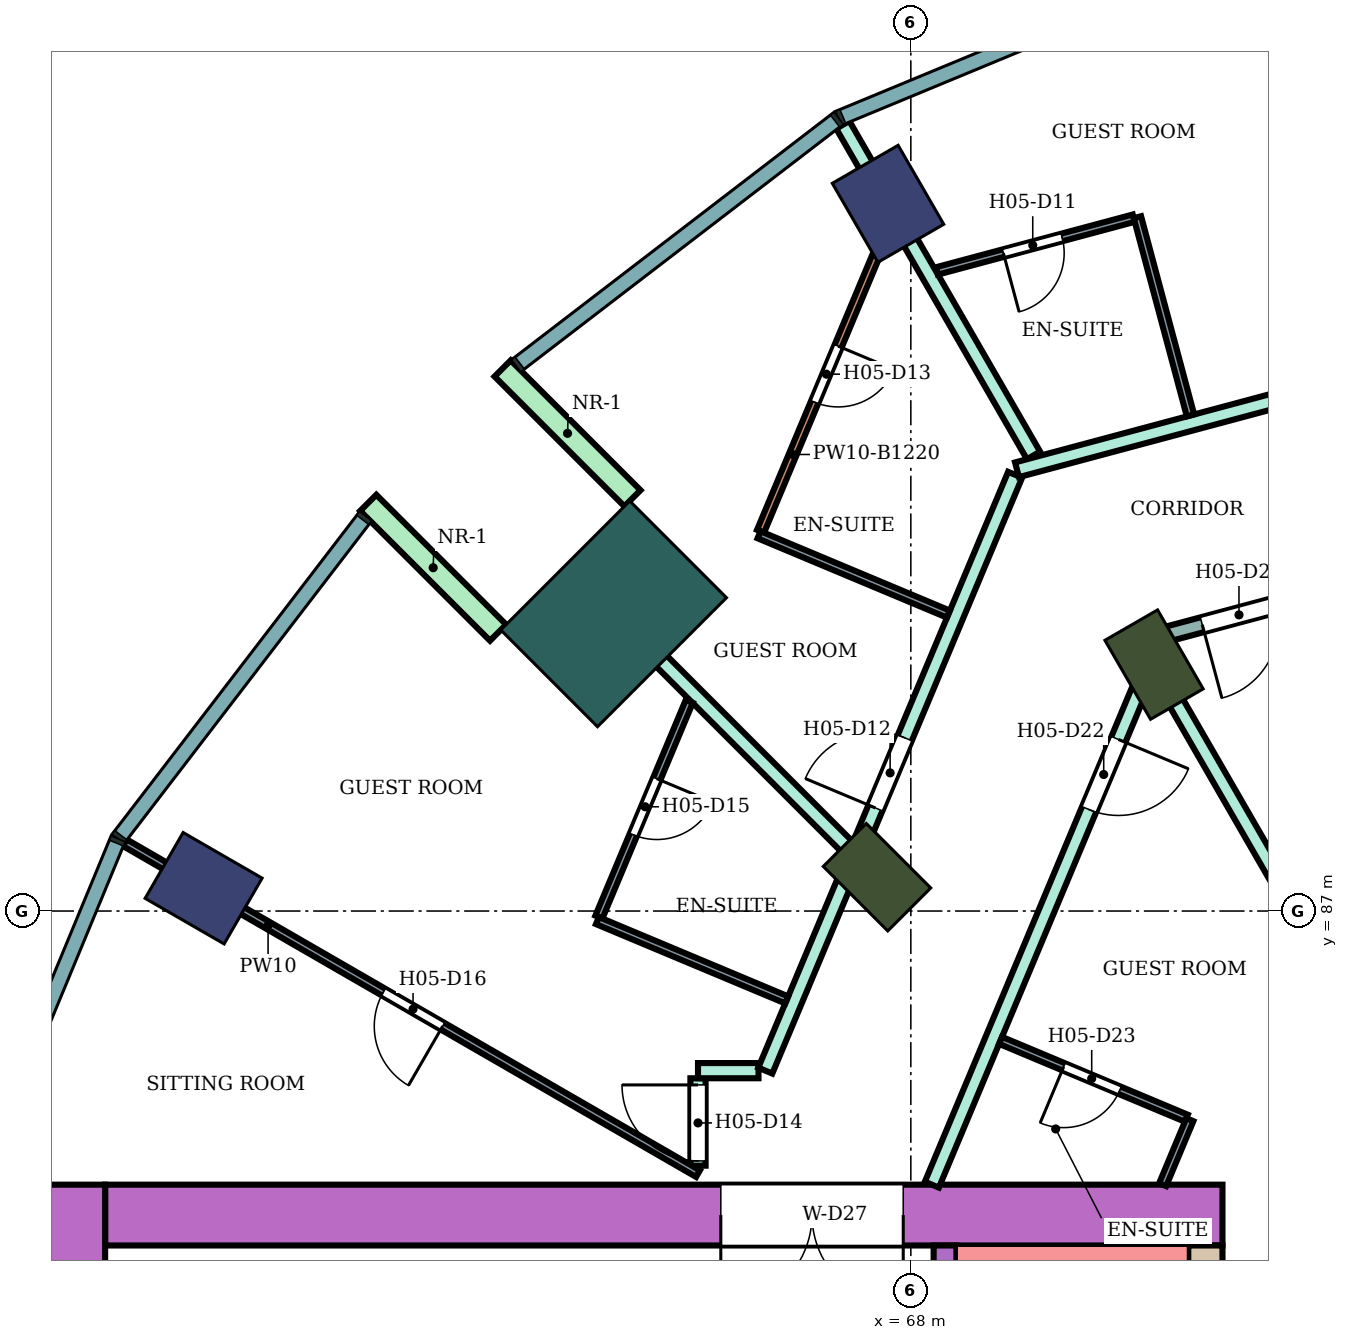
"""IFC4 building model, lengths in metres.
Left out: names, types, materials, properties, quantities, classifications, styles, units other than length and angle.
Written with IfcOpenShell. Run it as: python <this file> out.ifc"""

import sys

from ifc_helpers import new_model, si_unit, direction, frame, frame_2d, origin, origin_2d, place, context, subcontext, project, spatial, rectangle, extrude, element, fill, save


model = new_model("IFC4")
c1 = context("Model", 3, precision=1e-05, world=origin(), true_north=direction((0.0, 1.0)))
c2 = subcontext(c1, "Body", "Model", "MODEL_VIEW")
j1 = project(units=[si_unit("LENGTHUNIT", "METRE"), si_unit("PLANEANGLEUNIT", "RADIAN")], contexts=[c1])
p1 = place(None, origin())
s1 = spatial("IfcSite", under=j1, at=p1, CompositionType="ELEMENT")
p2 = place(p1, origin())
s2 = spatial("IfcBuilding", under=s1, at=p2, CompositionType="ELEMENT")
p3 = place(p2, frame((0.0, 0.0, 90.0)))
s3 = spatial("IfcBuildingStorey", under=s2, at=p3, CompositionType="ELEMENT", Elevation=90.0)
for number, where, z_axis, x_axis in (
    (1, (67.7, 96.304, 0.0), (0.0, 0.0, 1.0), (-0.5, 0.866, 0.0)),
    (2, (58.696, 87.3, 0.0), (0.0, 0.0, 1.0), (-0.866, 0.5, 0.0)),
):
    element("IfcColumn", number, at=place(p3, frame(where, z_axis=z_axis, x_axis=x_axis)), inside=s3, PredefinedType="COLUMN", context=c2, shape_type="SweptSolid", body=[
        extrude(rectangle(XDim=1.2, YDim=1.0, at=origin_2d()), origin(), (0.0, 0.0, 1.0), 3.8),
    ])
for number, where, z_axis, x_axis in (
    (3, (71.2, 90.242, 0.0), (0.0, 0.0, 1.0), (-0.5, 0.866, 0.0)),
    (4, (67.555, 87.445, 0.0), (0.0, 0.0, 1.0), (-0.707, 0.707, 0.0)),
):
    element("IfcColumn", number, at=place(p3, frame(where, z_axis=z_axis, x_axis=x_axis)), inside=s3, PredefinedType="COLUMN", context=c2, shape_type="SweptSolid", body=[
        extrude(rectangle(XDim=1.2, YDim=0.8, at=origin_2d()), origin(), (0.0, 0.0, 1.0), 3.8),
    ])
p4 = place(p3, frame((64.09, 90.91, 0.0), z_axis=(0.0, 0.0, 1.0), x_axis=(-0.707106781187, 0.707106781187, 0.0)))
e5 = element("IfcColumn", 5, at=p4, inside=s3, PredefinedType="COLUMN", context=c2, shape_type="SweptSolid", body=[
    extrude(rectangle(XDim=1.8, YDim=2.4, at=origin_2d()), origin(), (0.0, 0.0, 1.0), 3.8),
])
p5 = place(p3, frame((72.1, 83.0, 0.0), z_axis=(0.0, 0.0, 1.0), x_axis=(-1.0, 0.0, 0.0)))
e6 = element("IfcWall", 6, at=p5, inside=s3, PredefinedType="SHEAR", context=c2, shape_type="SweptSolid", body=[
    extrude(rectangle(XDim=14.7, YDim=0.8, at=frame_2d((7.35, 0.0))), origin(), (0.0, 0.0, 1.0), 3.48),
])
p6 = place(p5, frame((4.2, 0.0, 0.0)))
e7 = element("IfcOpeningElement", 7, at=p6, cuts=e6, PredefinedType="OPENING", context=c2, shape_type="SweptSolid", body=[
    extrude(rectangle(XDim=2.4, YDim=2.4, at=frame_2d((1.2, 1.2))), frame((0.0, 0.41, 0.0), z_axis=(0.0, -1.0, 0.0), x_axis=(1.0, 0.0, 0.0)), (0.0, 0.0, 1.0), 0.82),
])
p7 = place(p3, frame((71.875, 82.6, 0.0), z_axis=(0.0, 0.0, 1.0), x_axis=(0.0, -1.0, 0.0)))
e8 = element("IfcWall", 8, at=p7, inside=s3, PredefinedType="SHEAR", context=c2, shape_type="SweptSolid", body=[
    extrude(rectangle(XDim=7.6, YDim=0.45, at=frame_2d((3.8, 0.0))), origin(), (0.0, 0.0, 1.0), 3.48),
])
p8 = place(p3, frame((57.0, 83.4, 0.0), z_axis=(0.0, 0.0, 1.0), x_axis=(0.0, -1.0, 0.0)))
e9 = element("IfcWall", 9, at=p8, inside=s3, PredefinedType="SHEAR", context=c2, shape_type="SweptSolid", body=[
    extrude(rectangle(XDim=16.8, YDim=0.8, at=frame_2d((8.4, 0.0))), origin(), (0.0, 0.0, 1.0), 3.48),
])
p9 = place(p3, frame((68.45, 82.6, 0.0), z_axis=(0.0, 0.0, 1.0), x_axis=(0.0, -1.0, 0.0)))
e10 = element("IfcWall", 10, at=p9, inside=s3, PredefinedType="SHEAR", context=c2, shape_type="SweptSolid", body=[
    extrude(rectangle(XDim=7.6, YDim=0.3, at=frame_2d((3.8, 0.0))), origin(), (0.0, 0.0, 1.0), 3.48),
])
p10 = place(p9, frame((0.25, 0.0, 0.0)))
e11 = element("IfcOpeningElement", 11, at=p10, cuts=e10, PredefinedType="OPENING", context=c2, shape_type="SweptSolid", body=[
    extrude(rectangle(XDim=0.9, YDim=2.1, at=frame_2d((0.45, 1.05))), frame((0.0, 0.16, 0.0), z_axis=(0.0, -1.0, 0.0), x_axis=(1.0, 0.0, 0.0)), (0.0, 0.0, 1.0), 0.32),
])
for number, where, z_axis, x_axis in (
    (12, (64.338, 92.43, 0.0), (0.0, 0.0, 1.0), (-0.707, 0.707, 0.0)),
    (13, (62.57, 90.662, 0.0), (0.0, 0.0, 1.0), (-0.707, 0.707, 0.0)),
):
    element("IfcWall", number, at=place(p3, frame(where, z_axis=z_axis, x_axis=x_axis)), inside=s3, PredefinedType="NOTDEFINED", context=c2, shape_type="SweptSolid", body=[
        extrude(rectangle(XDim=2.416, YDim=0.3, at=frame_2d((1.208, 0.0))), origin(), (0.0, 0.0, 1.0), 3.8),
    ])
p11 = place(p3, frame((63.6, 91.409, 0.0), z_axis=(0.0, 0.0, 1.0), x_axis=(0.70693749829, -0.707276023566, 0.0)))
e14 = element("IfcWall", 14, at=p11, inside=s3, PredefinedType="PARTITIONING", context=c2, shape_type="SweptSolid", body=[
    extrude(rectangle(XDim=5.048, YDim=0.2, at=frame_2d((2.524, 0.0))), origin(), (0.0, 0.0, 1.0), 3.35),
])
p12 = place(p3, frame((65.2, 83.65, 0.0), z_axis=(0.0, 0.0, 1.0), x_axis=(0.0, 1.0, 0.0)))
e15 = element("IfcWall", 15, at=p12, inside=s3, PredefinedType="PARTITIONING", context=c2, shape_type="SweptSolid", body=[
    extrude(rectangle(XDim=1.15, YDim=0.2, at=frame_2d((0.575, 0.0))), origin(), (0.0, 0.0, 1.0), 3.35),
])
p13 = place(p12, frame((0.062, 0.0, 0.0)))
e16 = element("IfcOpeningElement", 16, at=p13, cuts=e15, PredefinedType="OPENING", context=c2, shape_type="SweptSolid", body=[
    extrude(rectangle(XDim=1.0, YDim=2.1, at=frame_2d((0.5, 1.05))), frame((0.0, 0.11, 0.0), z_axis=(0.0, -1.0, 0.0), x_axis=(1.0, 0.0, 0.0)), (0.0, 0.0, 1.0), 0.22),
])
p14 = place(p3, frame((65.2, 84.9, 0.0), z_axis=(0.0, 0.0, 1.0), x_axis=(1.0, 0.0, 0.0)))
e17 = element("IfcWall", 17, at=p14, inside=s3, PredefinedType="PARTITIONING", context=c2, shape_type="SweptSolid", body=[
    extrude(rectangle(XDim=0.796, YDim=0.2, at=frame_2d((0.398, 0.0))), origin(), (0.0, 0.0, 1.0), 3.35),
])
p15 = place(p3, frame((66.085, 84.9, 0.0), z_axis=(0.0, 0.0, 1.0), x_axis=(0.386676248006, 0.922215527536, 0.0)))
e18 = element("IfcWall", 18, at=p15, inside=s3, PredefinedType="PARTITIONING", context=c2, shape_type="SweptSolid", body=[
    extrude(rectangle(XDim=8.5, YDim=0.2, at=frame_2d((4.25, 0.0))), origin(), (0.0, 0.0, 1.0), 3.35),
])
p16 = place(p15, frame((3.748, 0.0, 0.0)))
e19 = element("IfcOpeningElement", 19, at=p16, cuts=e18, PredefinedType="OPENING", context=c2, shape_type="SweptSolid", body=[
    extrude(rectangle(XDim=1.0, YDim=2.1, at=frame_2d((0.5, 1.05))), frame((0.0, 0.11, 0.0), z_axis=(0.0, -1.0, 0.0), x_axis=(1.0, 0.0, 0.0)), (0.0, 0.0, 1.0), 0.22),
])
p17 = place(p3, frame((67.104, 97.343, 0.0), z_axis=(0.0, 0.0, 1.0), x_axis=(0.499799615385, -0.866141064989, 0.0)))
e20 = element("IfcWall", 20, at=p17, inside=s3, PredefinedType="PARTITIONING", context=c2, shape_type="SweptSolid", body=[
    extrude(rectangle(XDim=5.021, YDim=0.2, at=frame_2d((2.511, 0.0))), origin(), (0.0, 0.0, 1.0), 3.35),
])
p18 = place(p3, frame((68.277, 83.4, 0.0), z_axis=(0.0, 0.0, 1.0), x_axis=(0.386454861164, 0.922308321703, 0.0)))
e21 = element("IfcWall", 21, at=p18, inside=s3, PredefinedType="PARTITIONING", context=c2, shape_type="SweptSolid", body=[
    extrude(rectangle(XDim=7.762, YDim=0.2, at=frame_2d((3.881, 0.0))), origin(), (0.0, 0.0, 1.0), 3.35),
])
p19 = place(p18, frame((5.351, 0.0, 0.0)))
e22 = element("IfcOpeningElement", 22, at=p19, cuts=e21, PredefinedType="OPENING", context=c2, shape_type="SweptSolid", body=[
    extrude(rectangle(XDim=1.0, YDim=2.1, at=frame_2d((0.5, 1.05))), frame((0.0, 0.11, 0.0), z_axis=(0.0, -1.0, 0.0), x_axis=(1.0, 0.0, 0.0)), (0.0, 0.0, 1.0), 0.22),
])
p20 = place(p3, frame((69.397, 92.805, 0.0), z_axis=(0.0, 0.0, 1.0), x_axis=(0.96596468683, 0.258673972015, 0.0)))
e23 = element("IfcWall", 23, at=p20, inside=s3, PredefinedType="PARTITIONING", context=c2, shape_type="SweptSolid", body=[
    extrude(rectangle(XDim=10.937, YDim=0.2, at=frame_2d((5.469, 0.0))), origin(), (0.0, 0.0, 1.0), 3.35),
])
p21 = place(p20, frame((6.163, 0.0, 0.0)))
e24 = element("IfcOpeningElement", 24, at=p21, cuts=e23, PredefinedType="OPENING", context=c2, shape_type="SweptSolid", body=[
    extrude(rectangle(XDim=1.0, YDim=2.1, at=frame_2d((0.5, 1.05))), frame((0.0, 0.11, 0.0), z_axis=(0.0, -1.0, 0.0), x_axis=(1.0, 0.0, 0.0)), (0.0, 0.0, 1.0), 0.22),
])
p22 = place(p20, frame((4.103, 0.0, 0.0)))
e25 = element("IfcOpeningElement", 25, at=p22, cuts=e23, PredefinedType="OPENING", context=c2, shape_type="SweptSolid", body=[
    extrude(rectangle(XDim=1.0, YDim=2.1, at=frame_2d((0.5, 1.05))), frame((0.0, 0.11, 0.0), z_axis=(0.0, -1.0, 0.0), x_axis=(1.0, 0.0, 0.0)), (0.0, 0.0, 1.0), 0.22),
])
p23 = place(p3, frame((71.264, 90.135, 0.0), z_axis=(0.0, 0.0, 1.0), x_axis=(0.499791624077, -0.866145676259, 0.0)))
e26 = element("IfcWall", 26, at=p23, inside=s3, PredefinedType="PARTITIONING", context=c2, shape_type="SweptSolid", body=[
    extrude(rectangle(XDim=9.778, YDim=0.2, at=frame_2d((4.889, 0.0))), origin(), (0.0, 0.0, 1.0), 3.35),
])
p24 = place(p3, frame((71.303, 90.625, 0.0), z_axis=(0.0, 0.0, 1.0), x_axis=(0.965971868307, 0.258647152776, 0.0)))
e27 = element("IfcWall", 27, at=p24, inside=s3, PredefinedType="PARTITIONING", context=c2, shape_type="SweptSolid", body=[
    extrude(rectangle(XDim=8.874, YDim=0.2, at=frame_2d((4.437, 0.0))), origin(), (0.0, 0.0, 1.0), 2.98),
])
p25 = place(p24, frame((0.55, 0.0, 0.0)))
e28 = element("IfcOpeningElement", 28, at=p25, cuts=e27, PredefinedType="OPENING", context=c2, shape_type="SweptSolid", body=[
    extrude(rectangle(XDim=1.0, YDim=2.1, at=frame_2d((0.5, 1.05))), frame((0.0, 0.11, 0.0), z_axis=(0.0, -1.0, 0.0), x_axis=(1.0, 0.0, 0.0)), (0.0, 0.0, 1.0), 0.22),
])
p26 = place(p3, frame((57.659, 87.899, 0.0), z_axis=(0.0, 0.0, 1.0), x_axis=(0.86602264145, -0.500004784474, 0.0)))
e29 = element("IfcWall", 29, at=p26, inside=s3, PredefinedType="PARTITIONING", context=c2, shape_type="SweptSolid", body=[
    extrude(rectangle(XDim=8.708, YDim=0.1, at=frame_2d((4.354, 0.0))), origin(), (0.0, 0.0, 1.0), 3.35),
])
p27 = place(p26, frame((3.929, 0.0, 0.0)))
e30 = element("IfcOpeningElement", 30, at=p27, cuts=e29, PredefinedType="OPENING", context=c2, shape_type="SweptSolid", body=[
    extrude(rectangle(XDim=0.9, YDim=2.1, at=frame_2d((0.45, 1.05))), frame((0.0, 0.06, 0.0), z_axis=(0.0, -1.0, 0.0), x_axis=(1.0, 0.0, 0.0)), (0.0, 0.0, 1.0), 0.12),
])
p28 = place(p3, frame((63.896, 86.92, 0.0), z_axis=(0.0, 0.0, 1.0), x_axis=(0.386485049699, 0.922295671875, 0.0)))
e31 = element("IfcWall", 31, at=p28, inside=s3, PredefinedType="PARTITIONING", context=c2, shape_type="SweptSolid", body=[
    extrude(rectangle(XDim=3.077, YDim=0.1, at=frame_2d((1.539, 0.0))), origin(), (0.0, 0.0, 1.0), 3.35),
])
p29 = place(p28, frame((1.174, 0.0, 0.0)))
e32 = element("IfcOpeningElement", 32, at=p29, cuts=e31, PredefinedType="OPENING", context=c2, shape_type="SweptSolid", body=[
    extrude(rectangle(XDim=0.8, YDim=2.1, at=frame_2d((0.4, 1.05))), frame((0.0, 0.06, 0.0), z_axis=(0.0, -1.0, 0.0), x_axis=(1.0, 0.0, 0.0)), (0.0, 0.0, 1.0), 0.12),
])
p30 = place(p3, frame((63.877, 86.874, 0.0), z_axis=(0.0, 0.0, 1.0), x_axis=(0.922350337209, -0.386354572188, 0.0)))
e33 = element("IfcWall", 33, at=p30, inside=s3, PredefinedType="PARTITIONING", context=c2, shape_type="SweptSolid", body=[
    extrude(rectangle(XDim=2.7, YDim=0.1, at=frame_2d((1.35, 0.0))), origin(), (0.0, 0.0, 1.0), 3.35),
])
p31 = place(p3, frame((66.023, 91.996, 0.0), z_axis=(0.0, 0.0, 1.0), x_axis=(0.386497426192, 0.922290485447, 0.0)))
e34 = element("IfcWall", 34, at=p31, inside=s3, PredefinedType="PARTITIONING", context=c2, shape_type="SweptSolid", body=[
    extrude(rectangle(XDim=4.383, YDim=0.1, at=frame_2d((2.191, 0.0))), origin(), (0.0, 0.0, 1.0), 2.58),
])
p32 = place(p31, frame((1.841, 0.0, 0.0)))
e35 = element("IfcOpeningElement", 35, at=p32, cuts=e34, PredefinedType="OPENING", context=c2, shape_type="SweptSolid", body=[
    extrude(rectangle(XDim=0.8, YDim=2.1, at=frame_2d((0.4, 1.05))), frame((0.0, 0.06, 0.0), z_axis=(0.0, -1.0, 0.0), x_axis=(1.0, 0.0, 0.0)), (0.0, 0.0, 1.0), 0.12),
])
p33 = place(p3, frame((66.003, 91.95, 0.0), z_axis=(0.0, 0.0, 1.0), x_axis=(0.922350337209, -0.386354572188, 0.0)))
e36 = element("IfcWall", 36, at=p33, inside=s3, PredefinedType="PARTITIONING", context=c2, shape_type="SweptSolid", body=[
    extrude(rectangle(XDim=2.7, YDim=0.1, at=frame_2d((1.35, 0.0))), origin(), (0.0, 0.0, 1.0), 3.35),
])
p34 = place(p3, frame((68.343, 95.421, 0.0), z_axis=(0.0, 0.0, 1.0), x_axis=(0.965922846648, 0.258830165017, 0.0)))
e37 = element("IfcWall", 37, at=p34, inside=s3, PredefinedType="PARTITIONING", context=c2, shape_type="SweptSolid", body=[
    extrude(rectangle(XDim=2.681, YDim=0.1, at=frame_2d((1.34, 0.0))), origin(), (0.0, 0.0, 1.0), 3.35),
])
p35 = place(p34, frame((0.905, 0.0, 0.0)))
e38 = element("IfcOpeningElement", 38, at=p35, cuts=e37, PredefinedType="OPENING", context=c2, shape_type="SweptSolid", body=[
    extrude(rectangle(XDim=0.8, YDim=2.1, at=frame_2d((0.4, 1.05))), frame((0.0, 0.06, 0.0), z_axis=(0.0, -1.0, 0.0), x_axis=(1.0, 0.0, 0.0)), (0.0, 0.0, 1.0), 0.12),
])
p36 = place(p3, frame((69.181, 85.298, 0.0), z_axis=(0.0, 0.0, 1.0), x_axis=(0.922377635784, -0.38628939541, 0.0)))
e39 = element("IfcWall", 39, at=p36, inside=s3, PredefinedType="PARTITIONING", context=c2, shape_type="SweptSolid", body=[
    extrude(rectangle(XDim=2.65, YDim=0.1, at=frame_2d((1.325, 0.0))), origin(), (0.0, 0.0, 1.0), 3.35),
])
p37 = place(p36, frame((0.9, 0.0, 0.0)))
e40 = element("IfcOpeningElement", 40, at=p37, cuts=e39, PredefinedType="OPENING", context=c2, shape_type="SweptSolid", body=[
    extrude(rectangle(XDim=0.8, YDim=2.1, at=frame_2d((0.4, 1.05))), frame((0.0, 0.06, 0.0), z_axis=(0.0, -1.0, 0.0), x_axis=(1.0, 0.0, 0.0)), (0.0, 0.0, 1.0), 0.12),
])
p38 = place(p3, frame((70.981, 96.128, 0.0), z_axis=(0.0, 0.0, 1.0), x_axis=(0.25867580527, -0.965964195904, 0.0)))
e41 = element("IfcWall", 41, at=p38, inside=s3, PredefinedType="PARTITIONING", context=c2, shape_type="SweptSolid", body=[
    extrude(rectangle(XDim=2.699, YDim=0.1, at=frame_2d((1.35, 0.0))), origin(), (0.0, 0.0, 1.0), 3.35),
])
p39 = place(p3, frame((71.313, 83.4, 0.0), z_axis=(0.0, 0.0, 1.0), x_axis=(0.386148512695, 0.922436624459, 0.0)))
e42 = element("IfcWall", 42, at=p39, inside=s3, PredefinedType="PARTITIONING", context=c2, shape_type="SweptSolid", body=[
    extrude(rectangle(XDim=0.927, YDim=0.1, at=frame_2d((0.463, 0.0))), origin(), (0.0, 0.0, 1.0), 3.35),
])
p40 = place(p35, frame((0.8, 0.0, 0.0), z_axis=(0.0, 0.0, 1.0), x_axis=(-1.0, 0.0, 0.0)))
e43 = element("IfcDoor", 43, at=p40, inside=s3, OperationType="SINGLE_SWING_RIGHT", PredefinedType="DOOR", context=c2, shape_type="SweptSolid", body=[
    extrude(rectangle(XDim=0.8, YDim=2.1, at=frame_2d((0.4, 1.05))), frame((0.0, 0.025, 0.0), z_axis=(0.0, -1.0, 0.0), x_axis=(1.0, 0.0, 0.0)), (0.0, 0.0, 1.0), 0.05),
])
fill(e38, e43)
p41 = place(p16, origin())
e44 = element("IfcDoor", 44, at=p41, inside=s3, OperationType="SINGLE_SWING_LEFT", PredefinedType="DOOR", context=c2, shape_type="SweptSolid", body=[
    extrude(rectangle(XDim=1.0, YDim=2.1, at=frame_2d((0.5, 1.05))), frame((0.0, 0.025, 0.0), z_axis=(0.0, -1.0, 0.0), x_axis=(1.0, 0.0, 0.0)), (0.0, 0.0, 1.0), 0.05),
])
fill(e19, e44)
p42 = place(p32, frame((0.8, 0.0, 0.0), z_axis=(0.0, 0.0, 1.0), x_axis=(-1.0, 0.0, 0.0)))
e45 = element("IfcDoor", 45, at=p42, inside=s3, OperationType="SINGLE_SWING_LEFT", PredefinedType="DOOR", context=c2, shape_type="SweptSolid", body=[
    extrude(rectangle(XDim=0.8, YDim=2.1, at=frame_2d((0.4, 1.05))), frame((0.0, 0.025, 0.0), z_axis=(0.0, -1.0, 0.0), x_axis=(1.0, 0.0, 0.0)), (0.0, 0.0, 1.0), 0.05),
])
fill(e35, e45)
p43 = place(p13, origin())
e46 = element("IfcDoor", 46, at=p43, inside=s3, OperationType="SINGLE_SWING_RIGHT", PredefinedType="DOOR", context=c2, shape_type="SweptSolid", body=[
    extrude(rectangle(XDim=1.0, YDim=2.1, at=frame_2d((0.5, 1.05))), frame((0.0, 0.025, 0.0), z_axis=(0.0, -1.0, 0.0), x_axis=(1.0, 0.0, 0.0)), (0.0, 0.0, 1.0), 0.05),
])
fill(e16, e46)
p44 = place(p29, frame((0.8, 0.0, 0.0), z_axis=(0.0, 0.0, 1.0), x_axis=(-1.0, 0.0, 0.0)))
e47 = element("IfcDoor", 47, at=p44, inside=s3, OperationType="SINGLE_SWING_LEFT", PredefinedType="DOOR", context=c2, shape_type="SweptSolid", body=[
    extrude(rectangle(XDim=0.8, YDim=2.1, at=frame_2d((0.4, 1.05))), frame((0.0, 0.025, 0.0), z_axis=(0.0, -1.0, 0.0), x_axis=(1.0, 0.0, 0.0)), (0.0, 0.0, 1.0), 0.05),
])
fill(e32, e47)
p45 = place(p27, frame((0.9, 0.0, 0.0), z_axis=(0.0, 0.0, 1.0), x_axis=(-1.0, 0.0, 0.0)))
e48 = element("IfcDoor", 48, at=p45, inside=s3, OperationType="SINGLE_SWING_LEFT", PredefinedType="DOOR", context=c2, shape_type="SweptSolid", body=[
    extrude(rectangle(XDim=0.9, YDim=2.1, at=frame_2d((0.45, 1.05))), frame((0.0, 0.025, 0.0), z_axis=(0.0, -1.0, 0.0), x_axis=(1.0, 0.0, 0.0)), (0.0, 0.0, 1.0), 0.05),
])
fill(e30, e48)
p46 = place(p25, frame((1.0, 0.0, 0.0), z_axis=(0.0, 0.0, 1.0), x_axis=(-1.0, 0.0, 0.0)))
e49 = element("IfcDoor", 49, at=p46, inside=s3, OperationType="SINGLE_SWING_RIGHT", PredefinedType="DOOR", context=c2, shape_type="SweptSolid", body=[
    extrude(rectangle(XDim=1.0, YDim=2.1, at=frame_2d((0.5, 1.05))), frame((0.0, 0.025, 0.0), z_axis=(0.0, -1.0, 0.0), x_axis=(1.0, 0.0, 0.0)), (0.0, 0.0, 1.0), 0.05),
])
fill(e28, e49)
p47 = place(p19, frame((1.0, 0.0, 0.0), z_axis=(0.0, 0.0, 1.0), x_axis=(-1.0, 0.0, 0.0)))
e50 = element("IfcDoor", 50, at=p47, inside=s3, OperationType="SINGLE_SWING_LEFT", PredefinedType="DOOR", context=c2, shape_type="SweptSolid", body=[
    extrude(rectangle(XDim=1.0, YDim=2.1, at=frame_2d((0.5, 1.05))), frame((0.0, 0.025, 0.0), z_axis=(0.0, -1.0, 0.0), x_axis=(1.0, 0.0, 0.0)), (0.0, 0.0, 1.0), 0.05),
])
fill(e22, e50)
p48 = place(p37, frame((0.8, 0.0, 0.0), z_axis=(0.0, 0.0, 1.0), x_axis=(-1.0, 0.0, 0.0)))
e51 = element("IfcDoor", 51, at=p48, inside=s3, OperationType="SINGLE_SWING_RIGHT", PredefinedType="DOOR", context=c2, shape_type="SweptSolid", body=[
    extrude(rectangle(XDim=0.8, YDim=2.1, at=frame_2d((0.4, 1.05))), frame((0.0, 0.025, 0.0), z_axis=(0.0, -1.0, 0.0), x_axis=(1.0, 0.0, 0.0)), (0.0, 0.0, 1.0), 0.05),
])
fill(e40, e51)
p49 = place(p6, origin())
e52 = element("IfcDoor", 52, at=p49, inside=s3, OperationType="DOUBLE_DOOR_SINGLE_SWING", PredefinedType="DOOR", context=c2, shape_type="SweptSolid", body=[
    extrude(rectangle(XDim=2.4, YDim=2.4, at=frame_2d((1.2, 1.2))), frame((0.0, 0.025, 0.0), z_axis=(0.0, -1.0, 0.0), x_axis=(1.0, 0.0, 0.0)), (0.0, 0.0, 1.0), 0.05),
])
fill(e7, e52)
save(model, sys.argv[1])
